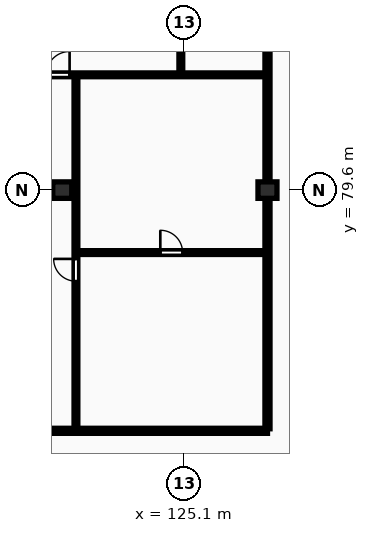
"""IFC4 building model, lengths in metres.
Left out: names, types, materials, properties, quantities, classifications, styles, units other than length and angle.
Written with IfcOpenShell. Run it as: python <this file> out.ifc"""

import sys

from ifc_helpers import new_model, si_unit, direction, frame, frame_2d, origin, origin_2d, place, context, subcontext, project, spatial, rectangle, extrude, element, fill, save


model = new_model("IFC4")
c1 = context("Model", 3, precision=1e-05, world=origin(), true_north=direction((0.0, 1.0)))
c2 = subcontext(c1, "Body", "Model", "MODEL_VIEW")
j1 = project(units=[si_unit("LENGTHUNIT", "METRE"), si_unit("PLANEANGLEUNIT", "RADIAN")], contexts=[c1])
p1 = place(None, origin())
s1 = spatial("IfcSite", under=j1, at=p1, CompositionType="ELEMENT")
p2 = place(p1, origin())
s2 = spatial("IfcBuilding", under=s1, at=p2, CompositionType="ELEMENT")
p3 = place(p2, frame((0.0, 0.0, 235.55)))
s3 = spatial("IfcBuildingStorey", under=s2, at=p3, CompositionType="ELEMENT", Elevation=235.55)
for number, where, z_axis, x_axis in (
    (1, (120.3, 79.6, 0.0), (0.0, 0.0, 1.0), (1.0, 0.0, 0.0)),
    (2, (128.4, 79.6, 0.0), (0.0, 0.0, 1.0), (1.0, 0.0, 0.0)),
):
    element("IfcColumn", number, at=place(p3, frame(where, z_axis=z_axis, x_axis=x_axis)), inside=s3, PredefinedType="COLUMN", context=c2, shape_type="SweptSolid", body=[
        extrude(rectangle(XDim=0.75, YDim=0.65, at=origin_2d()), origin(), (0.0, 0.0, 1.0), 3.45),
    ])
p4 = place(p3, frame((128.4, 70.18, 0.0), z_axis=(0.0, 0.0, 1.0), x_axis=(0.0, 1.0, 0.0)))
e3 = element("IfcWall", 3, at=p4, inside=s3, PredefinedType="PARTITIONING", context=c2, shape_type="SweptSolid", body=[
    extrude(rectangle(XDim=24.32, YDim=0.2, at=frame_2d((12.16, 0.0))), origin(), (0.0, 0.0, 1.0), 2.477),
])
p5 = place(p3, frame((120.9, 77.135, 0.0), z_axis=(0.0, 0.0, 1.0), x_axis=(1.0, 0.0, 0.0)))
e4 = element("IfcWall", 4, at=p5, inside=s3, PredefinedType="PARTITIONING", context=c2, shape_type="SweptSolid", body=[
    extrude(rectangle(XDim=7.42, YDim=0.15, at=frame_2d((3.71, 0.0))), origin(), (0.0, 0.0, 1.0), 3.17),
])
p6 = place(p5, frame((3.27, 0.0, 0.0)))
e5 = element("IfcOpeningElement", 5, at=p6, cuts=e4, PredefinedType="OPENING", context=c2, shape_type="SweptSolid", body=[
    extrude(rectangle(XDim=0.88, YDim=2.06, at=frame_2d((0.44, 1.03))), frame((0.0, 0.085, 0.0), z_axis=(0.0, -1.0, 0.0), x_axis=(1.0, 0.0, 0.0)), (0.0, 0.0, 1.0), 0.17),
])
p7 = place(p3, frame((120.84, 70.16, 0.0), z_axis=(0.0, 0.0, 1.0), x_axis=(0.0, 1.0, 0.0)))
e6 = element("IfcWall", 6, at=p7, inside=s3, PredefinedType="PARTITIONING", context=c2, shape_type="SweptSolid", body=[
    extrude(rectangle(XDim=13.95, YDim=0.15, at=frame_2d((6.975, 0.0))), origin(), (0.0, 0.0, 1.0), 3.17),
])
p8 = place(p7, frame((5.845, 0.0, 0.0)))
e7 = element("IfcOpeningElement", 7, at=p8, cuts=e6, PredefinedType="OPENING", context=c2, shape_type="SweptSolid", body=[
    extrude(rectangle(XDim=0.88, YDim=2.06, at=frame_2d((0.44, 1.03))), frame((0.0, 0.085, 0.0), z_axis=(0.0, -1.0, 0.0), x_axis=(1.0, 0.0, 0.0)), (0.0, 0.0, 1.0), 0.17),
])
p9 = place(p3, frame((124.98, 84.19, 0.0), z_axis=(0.0, 0.0, 1.0), x_axis=(0.0, 1.0, 0.0)))
e8 = element("IfcWall", 8, at=p9, inside=s3, PredefinedType="PARTITIONING", context=c2, shape_type="SweptSolid", body=[
    extrude(rectangle(XDim=10.31, YDim=0.15, at=frame_2d((5.155, 0.0))), origin(), (0.0, 0.0, 1.0), 3.17),
])
p10 = place(p9, frame((1.43, 0.0, 0.0)))
e9 = element("IfcOpeningElement", 9, at=p10, cuts=e8, PredefinedType="OPENING", context=c2, shape_type="SweptSolid", body=[
    extrude(rectangle(XDim=0.84, YDim=2.04, at=frame_2d((0.42, 1.02))), frame((0.0, 0.085, 0.0), z_axis=(0.0, -1.0, 0.0), x_axis=(1.0, 0.0, 0.0)), (0.0, 0.0, 1.0), 0.17),
])
p11 = place(p9, frame((3.92, 0.0, 0.0)))
e10 = element("IfcOpeningElement", 10, at=p11, cuts=e8, PredefinedType="OPENING", context=c2, shape_type="SweptSolid", body=[
    extrude(rectangle(XDim=0.84, YDim=2.04, at=frame_2d((0.42, 1.02))), frame((0.0, 0.085, 0.0), z_axis=(0.0, -1.0, 0.0), x_axis=(1.0, 0.0, 0.0)), (0.0, 0.0, 1.0), 0.17),
])
p12 = place(p9, frame((5.48, 0.0, 0.0)))
e11 = element("IfcOpeningElement", 11, at=p12, cuts=e8, PredefinedType="OPENING", context=c2, shape_type="SweptSolid", body=[
    extrude(rectangle(XDim=0.88, YDim=2.06, at=frame_2d((0.44, 1.03))), frame((0.0, 0.085, 0.0), z_axis=(0.0, -1.0, 0.0), x_axis=(1.0, 0.0, 0.0)), (0.0, 0.0, 1.0), 0.17),
])
p13 = place(p3, frame((116.95, 84.15, 0.0), z_axis=(0.0, 0.0, 1.0), x_axis=(1.0, 0.0, 0.0)))
e12 = element("IfcWall", 12, at=p13, inside=s3, PredefinedType="PARTITIONING", context=c2, shape_type="SweptSolid", body=[
    extrude(rectangle(XDim=11.37, YDim=0.15, at=frame_2d((5.685, 0.0))), origin(), (0.0, 0.0, 1.0), 3.17),
])
p14 = place(p13, frame((2.72, 0.0, 0.0)))
e13 = element("IfcOpeningElement", 13, at=p14, cuts=e12, PredefinedType="OPENING", context=c2, shape_type="SweptSolid", body=[
    extrude(rectangle(XDim=0.92, YDim=2.08, at=frame_2d((0.46, 1.04))), frame((0.0, 0.085, 0.0), z_axis=(0.0, -1.0, 0.0), x_axis=(1.0, 0.0, 0.0)), (0.0, 0.0, 1.0), 0.17),
])
p15 = place(p3, frame((59.8, 70.1, 0.0), z_axis=(0.0, 0.0, 1.0), x_axis=(1.0, 0.0, 0.0)))
e14 = element("IfcWall", 14, at=p15, inside=s3, PredefinedType="PARTITIONING", context=c2, shape_type="SweptSolid", body=[
    extrude(rectangle(XDim=68.6, YDim=0.2, at=frame_2d((34.3, 0.0))), origin(), (0.0, 0.0, 1.0), 3.17),
])
p16 = place(p15, frame((2.045, 0.0, 0.0)))
e15 = element("IfcOpeningElement", 15, at=p16, cuts=e14, PredefinedType="OPENING", context=c2, shape_type="SweptSolid", body=[
    extrude(rectangle(XDim=0.95, YDim=2.15, at=frame_2d((0.475, 1.075))), frame((0.0, 0.11, 0.0), z_axis=(0.0, -1.0, 0.0), x_axis=(1.0, 0.0, 0.0)), (0.0, 0.0, 1.0), 0.22),
])
p17 = place(p15, frame((29.246, 0.0, 0.0)))
e16 = element("IfcOpeningElement", 16, at=p17, cuts=e14, PredefinedType="OPENING", context=c2, shape_type="SweptSolid", body=[
    extrude(rectangle(XDim=1.22, YDim=2.18, at=frame_2d((0.61, 1.09))), frame((0.0, 0.11, 0.0), z_axis=(0.0, -1.0, 0.0), x_axis=(1.0, 0.0, 0.0)), (0.0, 0.0, 1.0), 0.22),
])
p18 = place(p15, frame((41.801, 0.0, 0.0)))
e17 = element("IfcOpeningElement", 17, at=p18, cuts=e14, PredefinedType="OPENING", context=c2, shape_type="SweptSolid", body=[
    extrude(rectangle(XDim=0.95, YDim=2.15, at=frame_2d((0.475, 1.075))), frame((0.0, 0.11, 0.0), z_axis=(0.0, -1.0, 0.0), x_axis=(1.0, 0.0, 0.0)), (0.0, 0.0, 1.0), 0.22),
])
p19 = place(p15, frame((59.115, 0.0, 0.0)))
e18 = element("IfcOpeningElement", 18, at=p19, cuts=e14, PredefinedType="OPENING", context=c2, shape_type="SweptSolid", body=[
    extrude(rectangle(XDim=0.95, YDim=2.15, at=frame_2d((0.475, 1.075))), frame((0.0, 0.11, 0.0), z_axis=(0.0, -1.0, 0.0), x_axis=(1.0, 0.0, 0.0)), (0.0, 0.0, 1.0), 0.22),
])
p20 = place(p6, origin())
e19 = element("IfcDoor", 19, at=p20, inside=s3, OperationType="SINGLE_SWING_LEFT", PredefinedType="DOOR", context=c2, shape_type="SweptSolid", body=[
    extrude(rectangle(XDim=0.88, YDim=2.06, at=frame_2d((0.44, 1.03))), frame((0.0, 0.025, 0.0), z_axis=(0.0, -1.0, 0.0), x_axis=(1.0, 0.0, 0.0)), (0.0, 0.0, 1.0), 0.05),
])
fill(e5, e19)
p21 = place(p8, origin())
e20 = element("IfcDoor", 20, at=p21, inside=s3, OperationType="SINGLE_SWING_RIGHT", PredefinedType="DOOR", context=c2, shape_type="SweptSolid", body=[
    extrude(rectangle(XDim=0.88, YDim=2.06, at=frame_2d((0.44, 1.03))), frame((0.0, 0.025, 0.0), z_axis=(0.0, -1.0, 0.0), x_axis=(1.0, 0.0, 0.0)), (0.0, 0.0, 1.0), 0.05),
])
fill(e7, e20)
p22 = place(p14, origin())
e21 = element("IfcDoor", 21, at=p22, inside=s3, OperationType="SINGLE_SWING_RIGHT", PredefinedType="DOOR", context=c2, shape_type="SweptSolid", body=[
    extrude(rectangle(XDim=0.92, YDim=2.08, at=frame_2d((0.46, 1.04))), frame((0.0, 0.025, 0.0), z_axis=(0.0, -1.0, 0.0), x_axis=(1.0, 0.0, 0.0)), (0.0, 0.0, 1.0), 0.05),
])
fill(e13, e21)
save(model, sys.argv[1])
